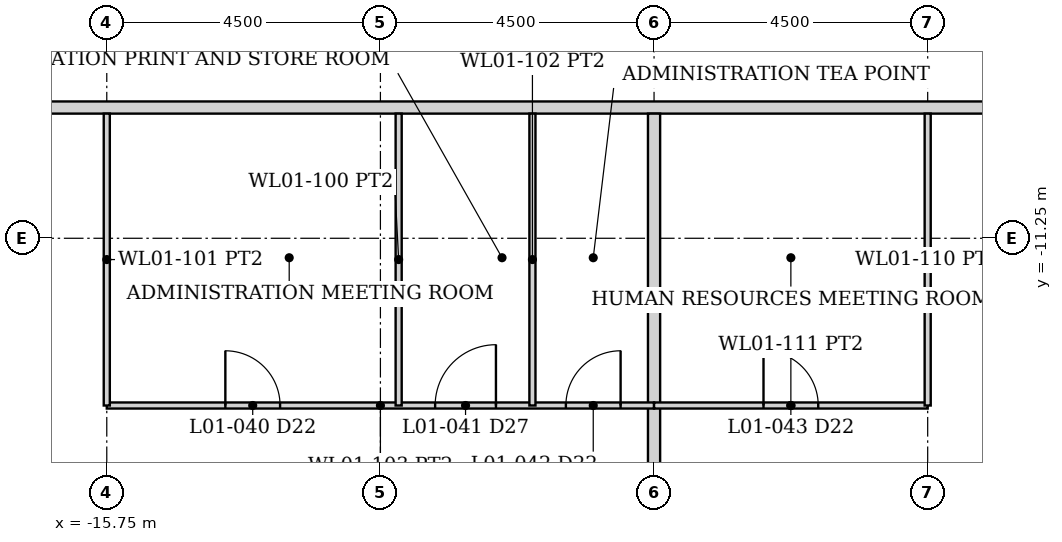
"""IFC4 building model, lengths in metres.
Left out: names, types, materials, properties, quantities, classifications, styles, units other than length and angle.
Written with IfcOpenShell. Run it as: python <this file> out.ifc"""

import sys

from ifc_helpers import new_model, si_unit, direction, frame, frame_2d, origin, place, context, subcontext, project, spatial, rectangle, extrude, element, fill, save


model = new_model("IFC4")
c1 = context("Model", 3, precision=1e-05, world=origin(), true_north=direction((0.0, 1.0)))
c2 = subcontext(c1, "Body", "Model", "MODEL_VIEW")
j1 = project(units=[si_unit("LENGTHUNIT", "METRE"), si_unit("PLANEANGLEUNIT", "RADIAN")], contexts=[c1])
p1 = place(None, origin())
s1 = spatial("IfcSite", under=j1, at=p1, CompositionType="ELEMENT")
p2 = place(p1, origin())
s2 = spatial("IfcBuilding", under=s1, at=p2, CompositionType="ELEMENT")
p3 = place(p2, frame((0.0, 0.0, 6.0)))
s3 = spatial("IfcBuildingStorey", under=s2, at=p3, CompositionType="ELEMENT", Elevation=6.0)
p4 = place(p3, frame((-25.075, -9.1, 0.0), z_axis=(0.0, 0.0, 1.0), x_axis=(1.0, 0.0, 0.0)))
e1 = element("IfcWall", 1, at=p4, inside=s3, PredefinedType="PARTITIONING", context=c2, shape_type="SweptSolid", body=[
    extrude(rectangle(XDim=50.15, YDim=0.2, at=frame_2d((25.075, 0.0))), origin(), (0.0, 0.0, 1.0), 3.829),
])
p5 = place(p4, frame((6.85, 0.0, 0.0)))
e2 = element("IfcOpeningElement", 2, at=p5, cuts=e1, PredefinedType="OPENING", context=c2, shape_type="SweptSolid", body=[
    extrude(rectangle(XDim=0.9, YDim=2.1, at=frame_2d((0.45, 1.05))), frame((0.0, 0.11, 0.0), z_axis=(0.0, -1.0, 0.0), x_axis=(1.0, 0.0, 0.0)), (0.0, 0.0, 1.0), 0.22),
])
p6 = place(p4, frame((24.625, 0.0, 0.0)))
e3 = element("IfcOpeningElement", 3, at=p6, cuts=e1, PredefinedType="OPENING", context=c2, shape_type="SweptSolid", body=[
    extrude(rectangle(XDim=0.9, YDim=2.1, at=frame_2d((0.45, 1.05))), frame((0.0, 0.11, 0.0), z_axis=(0.0, -1.0, 0.0), x_axis=(1.0, 0.0, 0.0)), (0.0, 0.0, 1.0), 0.22),
])
p7 = place(p4, frame((42.4, 0.0, 0.0)))
e4 = element("IfcOpeningElement", 4, at=p7, cuts=e1, PredefinedType="OPENING", context=c2, shape_type="SweptSolid", body=[
    extrude(rectangle(XDim=0.9, YDim=2.1, at=frame_2d((0.45, 1.05))), frame((0.0, 0.11, 0.0), z_axis=(0.0, -1.0, 0.0), x_axis=(1.0, 0.0, 0.0)), (0.0, 0.0, 1.0), 0.22),
])
p8 = place(p3, frame((-6.75, -29.089, 0.0), z_axis=(0.0, 0.0, 1.0), x_axis=(0.0, 1.0, 0.0)))
e5 = element("IfcWall", 5, at=p8, inside=s3, PredefinedType="PARTITIONING", context=c2, shape_type="SweptSolid", body=[
    extrude(rectangle(XDim=19.889, YDim=0.2, at=frame_2d((9.944, 0.0))), origin(), (0.0, 0.0, 1.0), 3.829),
])
p9 = place(p3, frame((-15.75, -14.0, 0.0), z_axis=(0.0, 0.0, 1.0), x_axis=(1.0, 0.0, 0.0)))
e6 = element("IfcWall", 6, at=p9, inside=s3, PredefinedType="PARTITIONING", context=c2, shape_type="SweptSolid", body=[
    extrude(rectangle(XDim=9.0, YDim=0.1, at=frame_2d((4.5, 0.0))), origin(), (0.0, 0.0, 1.0), 3.829),
])
p10 = place(p9, frame((1.95, 0.0, 0.0)))
e7 = element("IfcOpeningElement", 7, at=p10, cuts=e6, PredefinedType="OPENING", context=c2, shape_type="SweptSolid", body=[
    extrude(rectangle(XDim=0.9, YDim=2.1, at=frame_2d((0.45, 1.05))), frame((0.0, 0.06, 0.0), z_axis=(0.0, -1.0, 0.0), x_axis=(1.0, 0.0, 0.0)), (0.0, 0.0, 1.0), 0.12),
])
p11 = place(p9, frame((5.4, 0.0, 0.0)))
e8 = element("IfcOpeningElement", 8, at=p11, cuts=e6, PredefinedType="OPENING", context=c2, shape_type="SweptSolid", body=[
    extrude(rectangle(XDim=1.0, YDim=2.1, at=frame_2d((0.5, 1.05))), frame((0.0, 0.06, 0.0), z_axis=(0.0, -1.0, 0.0), x_axis=(1.0, 0.0, 0.0)), (0.0, 0.0, 1.0), 0.12),
])
p12 = place(p9, frame((7.55, 0.0, 0.0)))
e9 = element("IfcOpeningElement", 9, at=p12, cuts=e6, PredefinedType="OPENING", context=c2, shape_type="SweptSolid", body=[
    extrude(rectangle(XDim=0.9, YDim=2.1, at=frame_2d((0.45, 1.05))), frame((0.0, 0.06, 0.0), z_axis=(0.0, -1.0, 0.0), x_axis=(1.0, 0.0, 0.0)), (0.0, 0.0, 1.0), 0.12),
])
for number, where, z_axis, x_axis in (
    (10, (-15.75, -14.0, 0.0), (0.0, 0.0, 1.0), (0.0, 1.0, 0.0)),
    (11, (-10.95, -14.0, 0.0), (0.0, 0.0, 1.0), (0.0, 1.0, 0.0)),
    (12, (-8.75, -14.0, 0.0), (0.0, 0.0, 1.0), (0.0, 1.0, 0.0)),
):
    element("IfcWall", number, at=place(p3, frame(where, z_axis=z_axis, x_axis=x_axis)), inside=s3, PredefinedType="PARTITIONING", context=c2, shape_type="SweptSolid", body=[
        extrude(rectangle(XDim=4.8, YDim=0.1, at=frame_2d((2.4, 0.0))), origin(), (0.0, 0.0, 1.0), 3.829),
    ])
p13 = place(p3, frame((-6.75, -14.0, 0.0), z_axis=(0.0, 0.0, 1.0), x_axis=(1.0, 0.0, 0.0)))
e13 = element("IfcWall", 13, at=p13, inside=s3, PredefinedType="PARTITIONING", context=c2, shape_type="SweptSolid", body=[
    extrude(rectangle(XDim=4.5, YDim=0.1, at=frame_2d((2.25, 0.0))), origin(), (0.0, 0.0, 1.0), 3.829),
])
p14 = place(p13, frame((1.8, 0.0, 0.0)))
e14 = element("IfcOpeningElement", 14, at=p14, cuts=e13, PredefinedType="OPENING", context=c2, shape_type="SweptSolid", body=[
    extrude(rectangle(XDim=0.9, YDim=2.1, at=frame_2d((0.45, 1.05))), frame((0.0, 0.06, 0.0), z_axis=(0.0, -1.0, 0.0), x_axis=(1.0, 0.0, 0.0)), (0.0, 0.0, 1.0), 0.12),
])
p15 = place(p3, frame((-2.25, -14.0, 0.0), z_axis=(0.0, 0.0, 1.0), x_axis=(0.0, 1.0, 0.0)))
e15 = element("IfcWall", 15, at=p15, inside=s3, PredefinedType="PARTITIONING", context=c2, shape_type="SweptSolid", body=[
    extrude(rectangle(XDim=4.8, YDim=0.1, at=frame_2d((2.4, 0.0))), origin(), (0.0, 0.0, 1.0), 3.829),
])
p16 = place(p10, origin())
e16 = element("IfcDoor", 16, at=p16, inside=s3, OperationType="SINGLE_SWING_LEFT", PredefinedType="DOOR", context=c2, shape_type="SweptSolid", body=[
    extrude(rectangle(XDim=0.9, YDim=2.1, at=frame_2d((0.45, 1.05))), frame((0.0, 0.025, 0.0), z_axis=(0.0, -1.0, 0.0), x_axis=(1.0, 0.0, 0.0)), (0.0, 0.0, 1.0), 0.05),
])
fill(e7, e16)
p17 = place(p11, origin())
e17 = element("IfcDoor", 17, at=p17, inside=s3, OperationType="SINGLE_SWING_RIGHT", PredefinedType="DOOR", context=c2, shape_type="SweptSolid", body=[
    extrude(rectangle(XDim=1.0, YDim=2.1, at=frame_2d((0.5, 1.05))), frame((0.0, 0.025, 0.0), z_axis=(0.0, -1.0, 0.0), x_axis=(1.0, 0.0, 0.0)), (0.0, 0.0, 1.0), 0.05),
])
fill(e8, e17)
p18 = place(p12, origin())
e18 = element("IfcDoor", 18, at=p18, inside=s3, OperationType="SINGLE_SWING_RIGHT", PredefinedType="DOOR", context=c2, shape_type="SweptSolid", body=[
    extrude(rectangle(XDim=0.9, YDim=2.1, at=frame_2d((0.45, 1.05))), frame((0.0, 0.025, 0.0), z_axis=(0.0, -1.0, 0.0), x_axis=(1.0, 0.0, 0.0)), (0.0, 0.0, 1.0), 0.05),
])
fill(e9, e18)
p19 = place(p14, origin())
e19 = element("IfcDoor", 19, at=p19, inside=s3, OperationType="SINGLE_SWING_LEFT", PredefinedType="DOOR", context=c2, shape_type="SweptSolid", body=[
    extrude(rectangle(XDim=0.9, YDim=2.1, at=frame_2d((0.45, 1.05))), frame((0.0, 0.025, 0.0), z_axis=(0.0, -1.0, 0.0), x_axis=(1.0, 0.0, 0.0)), (0.0, 0.0, 1.0), 0.05),
])
fill(e14, e19)
save(model, sys.argv[1])
